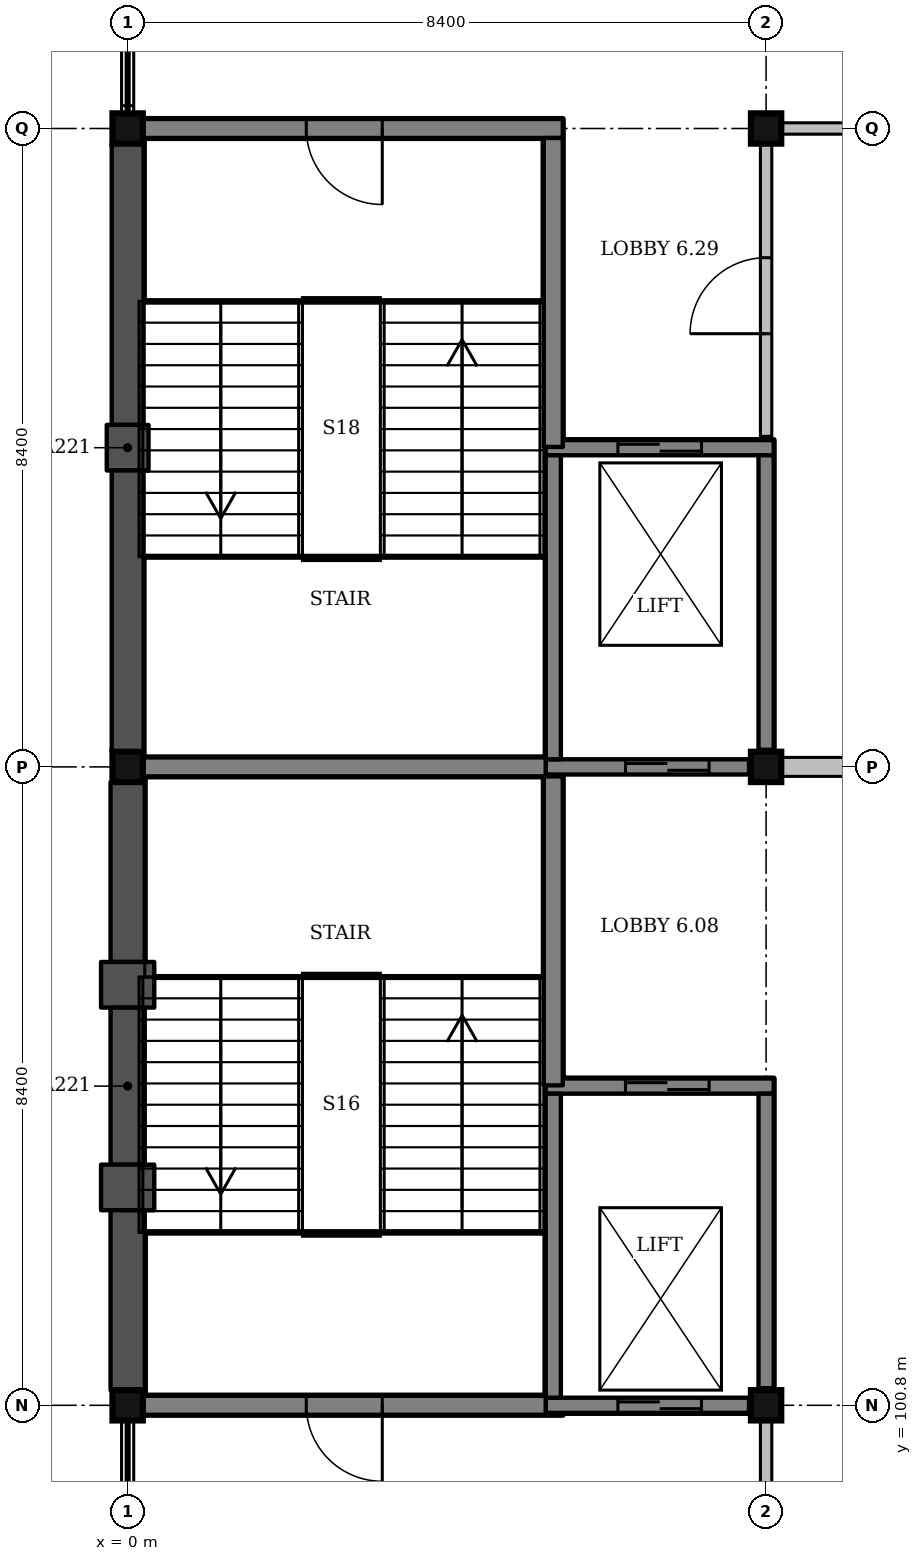
"""IFC4 building model, lengths in metres.
Left out: names, types, materials, properties, quantities, classifications, styles, units other than length and angle.
Written with IfcOpenShell. Run it as: python <this file> out.ifc"""

import sys

from ifc_helpers import new_model, si_unit, direction, frame, frame_2d, origin, origin_2d, place, context, subcontext, project, spatial, rectangle, extrude, element, fill, save


model = new_model("IFC4")
c1 = context("Model", 3, precision=1e-05, world=origin(), true_north=direction((0.0, 1.0)))
c2 = subcontext(c1, "Body", "Model", "MODEL_VIEW")
j1 = project(units=[si_unit("LENGTHUNIT", "METRE"), si_unit("PLANEANGLEUNIT", "RADIAN")], contexts=[c1])
p1 = place(None, origin())
s1 = spatial("IfcSite", under=j1, at=p1, CompositionType="ELEMENT")
p2 = place(p1, origin())
s2 = spatial("IfcBuilding", under=s1, at=p2, CompositionType="ELEMENT")
p3 = place(p2, frame((0.0, 0.0, 27.0)))
s3 = spatial("IfcBuildingStorey", under=s2, at=p3, CompositionType="ELEMENT", Elevation=27.0)
for number, where, z_axis, x_axis in (
    (1, (0.0, 100.8, 0.0), (0.0, 0.0, 1.0), (1.0, 0.0, 0.0)),
    (2, (0.0, 109.2, 0.0), (0.0, 0.0, 1.0), (1.0, 0.0, 0.0)),
    (3, (8.4, 100.8, 0.0), (0.0, 0.0, 1.0), (1.0, 0.0, 0.0)),
    (4, (8.4, 109.2, 0.0), (0.0, 0.0, 1.0), (1.0, 0.0, 0.0)),
    (5, (0.0, 117.6, 0.0), (0.0, 0.0, 1.0), (1.0, 0.0, 0.0)),
    (6, (8.4, 117.6, 0.0), (0.0, 0.0, 1.0), (1.0, 0.0, 0.0)),
):
    element("IfcColumn", number, at=place(p3, frame(where, z_axis=z_axis, x_axis=x_axis)), inside=s3, PredefinedType="COLUMN", context=c2, shape_type="SweptSolid", body=[
        extrude(rectangle(XDim=0.4, YDim=0.4, at=origin_2d()), origin(), (0.0, 0.0, 1.0), 4.5),
    ])
p4 = place(p3, frame((5.5, 100.8, 0.0), z_axis=(0.0, 0.0, 1.0), x_axis=(1.0, 0.0, 0.0)))
e7 = element("IfcWall", 7, at=p4, inside=s3, PredefinedType="SHEAR", context=c2, shape_type="SweptSolid", body=[
    extrude(rectangle(XDim=2.675, YDim=0.2, at=frame_2d((1.337, 0.0))), origin(), (0.0, 0.0, 1.0), 4.5),
])
p5 = place(p4, frame((0.95, 0.0, 0.0)))
e8 = element("IfcOpeningElement", 8, at=p5, cuts=e7, PredefinedType="OPENING", context=c2, shape_type="SweptSolid", body=[
    extrude(rectangle(XDim=1.1, YDim=2.1, at=frame_2d((0.55, 1.05))), frame((0.0, 0.11, 0.0), z_axis=(0.0, -1.0, 0.0), x_axis=(1.0, 0.0, 0.0)), (0.0, 0.0, 1.0), 0.22),
])
p6 = place(p3, frame((5.5, 105.0, 0.0), z_axis=(0.0, 0.0, 1.0), x_axis=(1.0, 0.0, 0.0)))
e9 = element("IfcWall", 9, at=p6, inside=s3, PredefinedType="SHEAR", context=c2, shape_type="SweptSolid", body=[
    extrude(rectangle(XDim=3.0, YDim=0.2, at=frame_2d((1.5, 0.0))), origin(), (0.0, 0.0, 1.0), 4.5),
])
p7 = place(p6, frame((1.05, 0.0, 0.0)))
e10 = element("IfcOpeningElement", 10, at=p7, cuts=e9, PredefinedType="OPENING", context=c2, shape_type="SweptSolid", body=[
    extrude(rectangle(XDim=1.1, YDim=2.1, at=frame_2d((0.55, 1.05))), frame((0.0, 0.11, 0.0), z_axis=(0.0, -1.0, 0.0), x_axis=(1.0, 0.0, 0.0)), (0.0, 0.0, 1.0), 0.22),
])
p8 = place(p3, frame((5.6, 100.9, 0.0), z_axis=(0.0, 0.0, 1.0), x_axis=(0.0, 1.0, 0.0)))
e11 = element("IfcWall", 11, at=p8, inside=s3, PredefinedType="SHEAR", context=c2, shape_type="SweptSolid", body=[
    extrude(rectangle(XDim=4.0, YDim=0.2, at=frame_2d((2.0, 0.0))), origin(), (0.0, 0.0, 1.0), 4.5),
])
p9 = place(p3, frame((8.4, 101.025, 0.0), z_axis=(0.0, 0.0, 1.0), x_axis=(0.0, 1.0, 0.0)))
e12 = element("IfcWall", 12, at=p9, inside=s3, PredefinedType="SHEAR", context=c2, shape_type="SweptSolid", body=[
    extrude(rectangle(XDim=3.875, YDim=0.2, at=frame_2d((1.938, 0.0))), origin(), (0.0, 0.0, 1.0), 4.5),
])
p10 = place(p3, frame((5.5, 109.2, 0.0), z_axis=(0.0, 0.0, 1.0), x_axis=(1.0, 0.0, 0.0)))
e13 = element("IfcWall", 13, at=p10, inside=s3, PredefinedType="SHEAR", context=c2, shape_type="SweptSolid", body=[
    extrude(rectangle(XDim=2.675, YDim=0.2, at=frame_2d((1.337, 0.0))), origin(), (0.0, 0.0, 1.0), 4.5),
])
p11 = place(p10, frame((1.05, 0.0, 0.0)))
e14 = element("IfcOpeningElement", 14, at=p11, cuts=e13, PredefinedType="OPENING", context=c2, shape_type="SweptSolid", body=[
    extrude(rectangle(XDim=1.1, YDim=2.1, at=frame_2d((0.55, 1.05))), frame((0.0, 0.11, 0.0), z_axis=(0.0, -1.0, 0.0), x_axis=(1.0, 0.0, 0.0)), (0.0, 0.0, 1.0), 0.22),
])
p12 = place(p3, frame((5.5, 113.4, 0.0), z_axis=(0.0, 0.0, 1.0), x_axis=(1.0, 0.0, 0.0)))
e15 = element("IfcWall", 15, at=p12, inside=s3, PredefinedType="SHEAR", context=c2, shape_type="SweptSolid", body=[
    extrude(rectangle(XDim=3.0, YDim=0.2, at=frame_2d((1.5, 0.0))), origin(), (0.0, 0.0, 1.0), 4.5),
])
p13 = place(p12, frame((0.95, 0.0, 0.0)))
e16 = element("IfcOpeningElement", 16, at=p13, cuts=e15, PredefinedType="OPENING", context=c2, shape_type="SweptSolid", body=[
    extrude(rectangle(XDim=1.1, YDim=2.1, at=frame_2d((0.55, 1.05))), frame((0.0, 0.11, 0.0), z_axis=(0.0, -1.0, 0.0), x_axis=(1.0, 0.0, 0.0)), (0.0, 0.0, 1.0), 0.22),
])
p14 = place(p3, frame((5.6, 109.3, 0.0), z_axis=(0.0, 0.0, 1.0), x_axis=(0.0, 1.0, 0.0)))
e17 = element("IfcWall", 17, at=p14, inside=s3, PredefinedType="SHEAR", context=c2, shape_type="SweptSolid", body=[
    extrude(rectangle(XDim=4.0, YDim=0.2, at=frame_2d((2.0, 0.0))), origin(), (0.0, 0.0, 1.0), 4.5),
])
p15 = place(p3, frame((8.4, 109.425, 0.0), z_axis=(0.0, 0.0, 1.0), x_axis=(0.0, 1.0, 0.0)))
e18 = element("IfcWall", 18, at=p15, inside=s3, PredefinedType="SHEAR", context=c2, shape_type="SweptSolid", body=[
    extrude(rectangle(XDim=3.875, YDim=0.2, at=frame_2d((1.938, 0.0))), origin(), (0.0, 0.0, 1.0), 4.5),
])
p16 = place(p3, frame((0.2, 100.8, 0.0), z_axis=(0.0, 0.0, 1.0), x_axis=(1.0, 0.0, 0.0)))
e19 = element("IfcWall", 19, at=p16, inside=s3, PredefinedType="SHEAR", context=c2, shape_type="SweptSolid", body=[
    extrude(rectangle(XDim=5.3, YDim=0.25, at=frame_2d((2.65, 0.0))), origin(), (0.0, 0.0, 1.0), 4.5),
])
p17 = place(p16, frame((2.15, 0.0, 0.0)))
e20 = element("IfcOpeningElement", 20, at=p17, cuts=e19, PredefinedType="OPENING", context=c2, shape_type="SweptSolid", body=[
    extrude(rectangle(XDim=1.0, YDim=2.1, at=frame_2d((0.5, 1.05))), frame((0.0, 0.135, 0.0), z_axis=(0.0, -1.0, 0.0), x_axis=(1.0, 0.0, 0.0)), (0.0, 0.0, 1.0), 0.27),
])
p18 = place(p3, frame((0.2, 109.2, 0.0), z_axis=(0.0, 0.0, 1.0), x_axis=(1.0, 0.0, 0.0)))
e21 = element("IfcWall", 21, at=p18, inside=s3, PredefinedType="SHEAR", context=c2, shape_type="SweptSolid", body=[
    extrude(rectangle(XDim=5.3, YDim=0.25, at=frame_2d((2.65, 0.0))), origin(), (0.0, 0.0, 1.0), 4.5),
])
p19 = place(p3, frame((5.6, 105.01, 0.0), z_axis=(0.0, 0.0, 1.0), x_axis=(0.0, 1.0, 0.0)))
e22 = element("IfcWall", 22, at=p19, inside=s3, PredefinedType="SHEAR", context=c2, shape_type="SweptSolid", body=[
    extrude(rectangle(XDim=4.065, YDim=0.25, at=frame_2d((2.032, 0.0))), origin(), (0.0, 0.0, 1.0), 4.5),
])
p20 = place(p3, frame((0.2, 117.6, 0.0), z_axis=(0.0, 0.0, 1.0), x_axis=(1.0, 0.0, 0.0)))
e23 = element("IfcWall", 23, at=p20, inside=s3, PredefinedType="SHEAR", context=c2, shape_type="SweptSolid", body=[
    extrude(rectangle(XDim=5.525, YDim=0.25, at=frame_2d((2.763, 0.0))), origin(), (0.0, 0.0, 1.0), 4.5),
])
p21 = place(p20, frame((2.15, 0.0, 0.0)))
e24 = element("IfcOpeningElement", 24, at=p21, cuts=e23, PredefinedType="OPENING", context=c2, shape_type="SweptSolid", body=[
    extrude(rectangle(XDim=1.0, YDim=2.1, at=frame_2d((0.5, 1.05))), frame((0.0, 0.135, 0.0), z_axis=(0.0, -1.0, 0.0), x_axis=(1.0, 0.0, 0.0)), (0.0, 0.0, 1.0), 0.27),
])
p22 = place(p3, frame((5.6, 113.41, 0.0), z_axis=(0.0, 0.0, 1.0), x_axis=(0.0, 1.0, 0.0)))
e25 = element("IfcWall", 25, at=p22, inside=s3, PredefinedType="SHEAR", context=c2, shape_type="SweptSolid", body=[
    extrude(rectangle(XDim=4.065, YDim=0.25, at=frame_2d((2.033, 0.0))), origin(), (0.0, 0.0, 1.0), 4.5),
])
p23 = place(p3, frame((0.0, 109.0, 0.0), z_axis=(0.0, 0.0, 1.0), x_axis=(0.0, -1.0, 0.0)))
e26 = element("IfcWall", 26, at=p23, inside=s3, PredefinedType="SOLIDWALL", context=c2, shape_type="SweptSolid", body=[
    extrude(rectangle(XDim=2.367, YDim=0.45, at=frame_2d((1.183, 0.0))), origin(), (0.0, 0.0, 1.0), 3.65),
])
p24 = place(p3, frame((0.0, 106.633, 0.0), z_axis=(0.0, 0.0, 1.0), x_axis=(0.0, -1.0, 0.0)))
e27 = element("IfcWall", 27, at=p24, inside=s3, PredefinedType="SOLIDWALL", context=c2, shape_type="SweptSolid", body=[
    extrude(rectangle(XDim=0.6, YDim=0.7, at=frame_2d((0.3, 0.0))), origin(), (0.0, 0.0, 1.0), 3.65),
])
p25 = place(p3, frame((0.0, 106.033, 0.0), z_axis=(0.0, 0.0, 1.0), x_axis=(0.0, -1.0, 0.0)))
e28 = element("IfcWall", 28, at=p25, inside=s3, PredefinedType="SOLIDWALL", context=c2, shape_type="SweptSolid", body=[
    extrude(rectangle(XDim=2.066, YDim=0.45, at=frame_2d((1.033, 0.0))), origin(), (0.0, 0.0, 1.0), 3.65),
])
p26 = place(p3, frame((0.0, 103.967, 0.0), z_axis=(0.0, 0.0, 1.0), x_axis=(0.0, -1.0, 0.0)))
e29 = element("IfcWall", 29, at=p26, inside=s3, PredefinedType="SOLIDWALL", context=c2, shape_type="SweptSolid", body=[
    extrude(rectangle(XDim=0.6, YDim=0.7, at=frame_2d((0.3, 0.0))), origin(), (0.0, 0.0, 1.0), 3.65),
])
p27 = place(p3, frame((0.0, 103.367, 0.0), z_axis=(0.0, 0.0, 1.0), x_axis=(0.0, -1.0, 0.0)))
e30 = element("IfcWall", 30, at=p27, inside=s3, PredefinedType="SOLIDWALL", context=c2, shape_type="SweptSolid", body=[
    extrude(rectangle(XDim=2.367, YDim=0.45, at=frame_2d((1.183, 0.0))), origin(), (0.0, 0.0, 1.0), 3.65),
])
p28 = place(p3, frame((0.0, 117.4, 0.0), z_axis=(0.0, 0.0, 1.0), x_axis=(0.0, -1.0, 0.0)))
e31 = element("IfcWall", 31, at=p28, inside=s3, PredefinedType="SOLIDWALL", context=c2, shape_type="SweptSolid", body=[
    extrude(rectangle(XDim=3.7, YDim=0.42, at=frame_2d((1.85, 0.0))), origin(), (0.0, 0.0, 1.0), 4.5),
])
p29 = place(p3, frame((0.0, 113.7, 0.0), z_axis=(0.0, 0.0, 1.0), x_axis=(0.0, -1.0, 0.0)))
e32 = element("IfcWall", 32, at=p29, inside=s3, PredefinedType="SOLIDWALL", context=c2, shape_type="SweptSolid", body=[
    extrude(rectangle(XDim=0.6, YDim=0.55, at=frame_2d((0.3, 0.0))), origin(), (0.0, 0.0, 1.0), 4.5),
])
p30 = place(p3, frame((0.0, 113.1, 0.0), z_axis=(0.0, 0.0, 1.0), x_axis=(0.0, -1.0, 0.0)))
e33 = element("IfcWall", 33, at=p30, inside=s3, PredefinedType="SOLIDWALL", context=c2, shape_type="SweptSolid", body=[
    extrude(rectangle(XDim=3.7, YDim=0.42, at=frame_2d((1.85, 0.0))), origin(), (0.0, 0.0, 1.0), 4.5),
])
p31 = place(p3, frame((8.6, 109.2, 0.0), z_axis=(0.0, 0.0, 1.0), x_axis=(1.0, 0.0, 0.0)))
e34 = element("IfcWall", 34, at=p31, inside=s3, PredefinedType="SOLIDWALL", context=c2, shape_type="SweptSolid", body=[
    extrude(rectangle(XDim=8.0, YDim=0.25, at=frame_2d((4.0, 0.0))), origin(), (0.0, 0.0, 1.0), 3.4),
])
p32 = place(p3, frame((8.6, 117.6, 0.0), z_axis=(0.0, 0.0, 1.0), x_axis=(1.0, 0.0, 0.0)))
e35 = element("IfcWall", 35, at=p32, inside=s3, PredefinedType="PARTITIONING", context=c2, shape_type="SweptSolid", body=[
    extrude(rectangle(XDim=8.0, YDim=0.15, at=frame_2d((4.0, 0.0))), origin(), (0.0, 0.0, 1.0), 3.4),
])
p33 = place(p3, frame((8.4, 92.6, 0.0), z_axis=(0.0, 0.0, 1.0), x_axis=(0.0, 1.0, 0.0)))
e36 = element("IfcWall", 36, at=p33, inside=s3, PredefinedType="PARTITIONING", context=c2, shape_type="SweptSolid", body=[
    extrude(rectangle(XDim=8.0, YDim=0.15, at=frame_2d((4.0, 0.0))), origin(), (0.0, 0.0, 1.0), 3.4),
])
p34 = place(p33, frame((3.45, 0.0, 0.0)))
e37 = element("IfcOpeningElement", 37, at=p34, cuts=e36, PredefinedType="OPENING", context=c2, shape_type="SweptSolid", body=[
    extrude(rectangle(XDim=1.0, YDim=2.1, at=frame_2d((0.5, 1.05))), frame((0.0, 0.085, 0.0), z_axis=(0.0, -1.0, 0.0), x_axis=(1.0, 0.0, 0.0)), (0.0, 0.0, 1.0), 0.17),
])
p35 = place(p3, frame((8.4, 113.55, 0.0), z_axis=(0.0, 0.0, 1.0), x_axis=(0.0, 1.0, 0.0)))
e38 = element("IfcWall", 38, at=p35, inside=s3, PredefinedType="PARTITIONING", context=c2, shape_type="SweptSolid", body=[
    extrude(rectangle(XDim=3.85, YDim=0.15, at=frame_2d((1.925, 0.0))), origin(), (0.0, 0.0, 1.0), 3.4),
])
p36 = place(p35, frame((1.35, 0.0, 0.0)))
e39 = element("IfcOpeningElement", 39, at=p36, cuts=e38, PredefinedType="OPENING", context=c2, shape_type="SweptSolid", body=[
    extrude(rectangle(XDim=1.0, YDim=2.1, at=frame_2d((0.5, 1.05))), frame((0.0, 0.085, 0.0), z_axis=(0.0, -1.0, 0.0), x_axis=(1.0, 0.0, 0.0)), (0.0, 0.0, 1.0), 0.17),
])
p37 = place(p36, origin())
e40 = element("IfcDoor", 40, at=p37, inside=s3, OperationType="SINGLE_SWING_LEFT", PredefinedType="DOOR", context=c2, shape_type="SweptSolid", body=[
    extrude(rectangle(XDim=1.0, YDim=2.1, at=frame_2d((0.5, 1.05))), frame((0.0, 0.025, 0.0), z_axis=(0.0, -1.0, 0.0), x_axis=(1.0, 0.0, 0.0)), (0.0, 0.0, 1.0), 0.05),
])
fill(e39, e40)
p38 = place(p17, origin())
e41 = element("IfcDoor", 41, at=p38, inside=s3, OperationType="SINGLE_SWING_RIGHT", PredefinedType="DOOR", context=c2, shape_type="SweptSolid", body=[
    extrude(rectangle(XDim=1.0, YDim=2.1, at=frame_2d((0.5, 1.05))), frame((0.0, 0.025, 0.0), z_axis=(0.0, -1.0, 0.0), x_axis=(1.0, 0.0, 0.0)), (0.0, 0.0, 1.0), 0.05),
])
fill(e20, e41)
p39 = place(p21, origin())
e42 = element("IfcDoor", 42, at=p39, inside=s3, OperationType="SINGLE_SWING_RIGHT", PredefinedType="DOOR", context=c2, shape_type="SweptSolid", body=[
    extrude(rectangle(XDim=1.0, YDim=2.1, at=frame_2d((0.5, 1.05))), frame((0.0, 0.025, 0.0), z_axis=(0.0, -1.0, 0.0), x_axis=(1.0, 0.0, 0.0)), (0.0, 0.0, 1.0), 0.05),
])
fill(e24, e42)
p40 = place(p5, origin())
e43 = element("IfcDoor", 43, at=p40, inside=s3, OperationType="SLIDING_TO_RIGHT", PredefinedType="DOOR", context=c2, shape_type="SweptSolid", body=[
    extrude(rectangle(XDim=1.1, YDim=2.1, at=frame_2d((0.55, 1.05))), frame((0.0, 0.025, 0.0), z_axis=(0.0, -1.0, 0.0), x_axis=(1.0, 0.0, 0.0)), (0.0, 0.0, 1.0), 0.05),
])
fill(e8, e43)
p41 = place(p7, origin())
e44 = element("IfcDoor", 44, at=p41, inside=s3, OperationType="SLIDING_TO_LEFT", PredefinedType="DOOR", context=c2, shape_type="SweptSolid", body=[
    extrude(rectangle(XDim=1.1, YDim=2.1, at=frame_2d((0.55, 1.05))), frame((0.0, 0.025, 0.0), z_axis=(0.0, -1.0, 0.0), x_axis=(1.0, 0.0, 0.0)), (0.0, 0.0, 1.0), 0.05),
])
fill(e10, e44)
p42 = place(p11, origin())
e45 = element("IfcDoor", 45, at=p42, inside=s3, OperationType="SLIDING_TO_RIGHT", PredefinedType="DOOR", context=c2, shape_type="SweptSolid", body=[
    extrude(rectangle(XDim=1.1, YDim=2.1, at=frame_2d((0.55, 1.05))), frame((0.0, 0.025, 0.0), z_axis=(0.0, -1.0, 0.0), x_axis=(1.0, 0.0, 0.0)), (0.0, 0.0, 1.0), 0.05),
])
fill(e14, e45)
p43 = place(p13, origin())
e46 = element("IfcDoor", 46, at=p43, inside=s3, OperationType="SLIDING_TO_LEFT", PredefinedType="DOOR", context=c2, shape_type="SweptSolid", body=[
    extrude(rectangle(XDim=1.1, YDim=2.1, at=frame_2d((0.55, 1.05))), frame((0.0, 0.025, 0.0), z_axis=(0.0, -1.0, 0.0), x_axis=(1.0, 0.0, 0.0)), (0.0, 0.0, 1.0), 0.05),
])
fill(e16, e46)
save(model, sys.argv[1])
